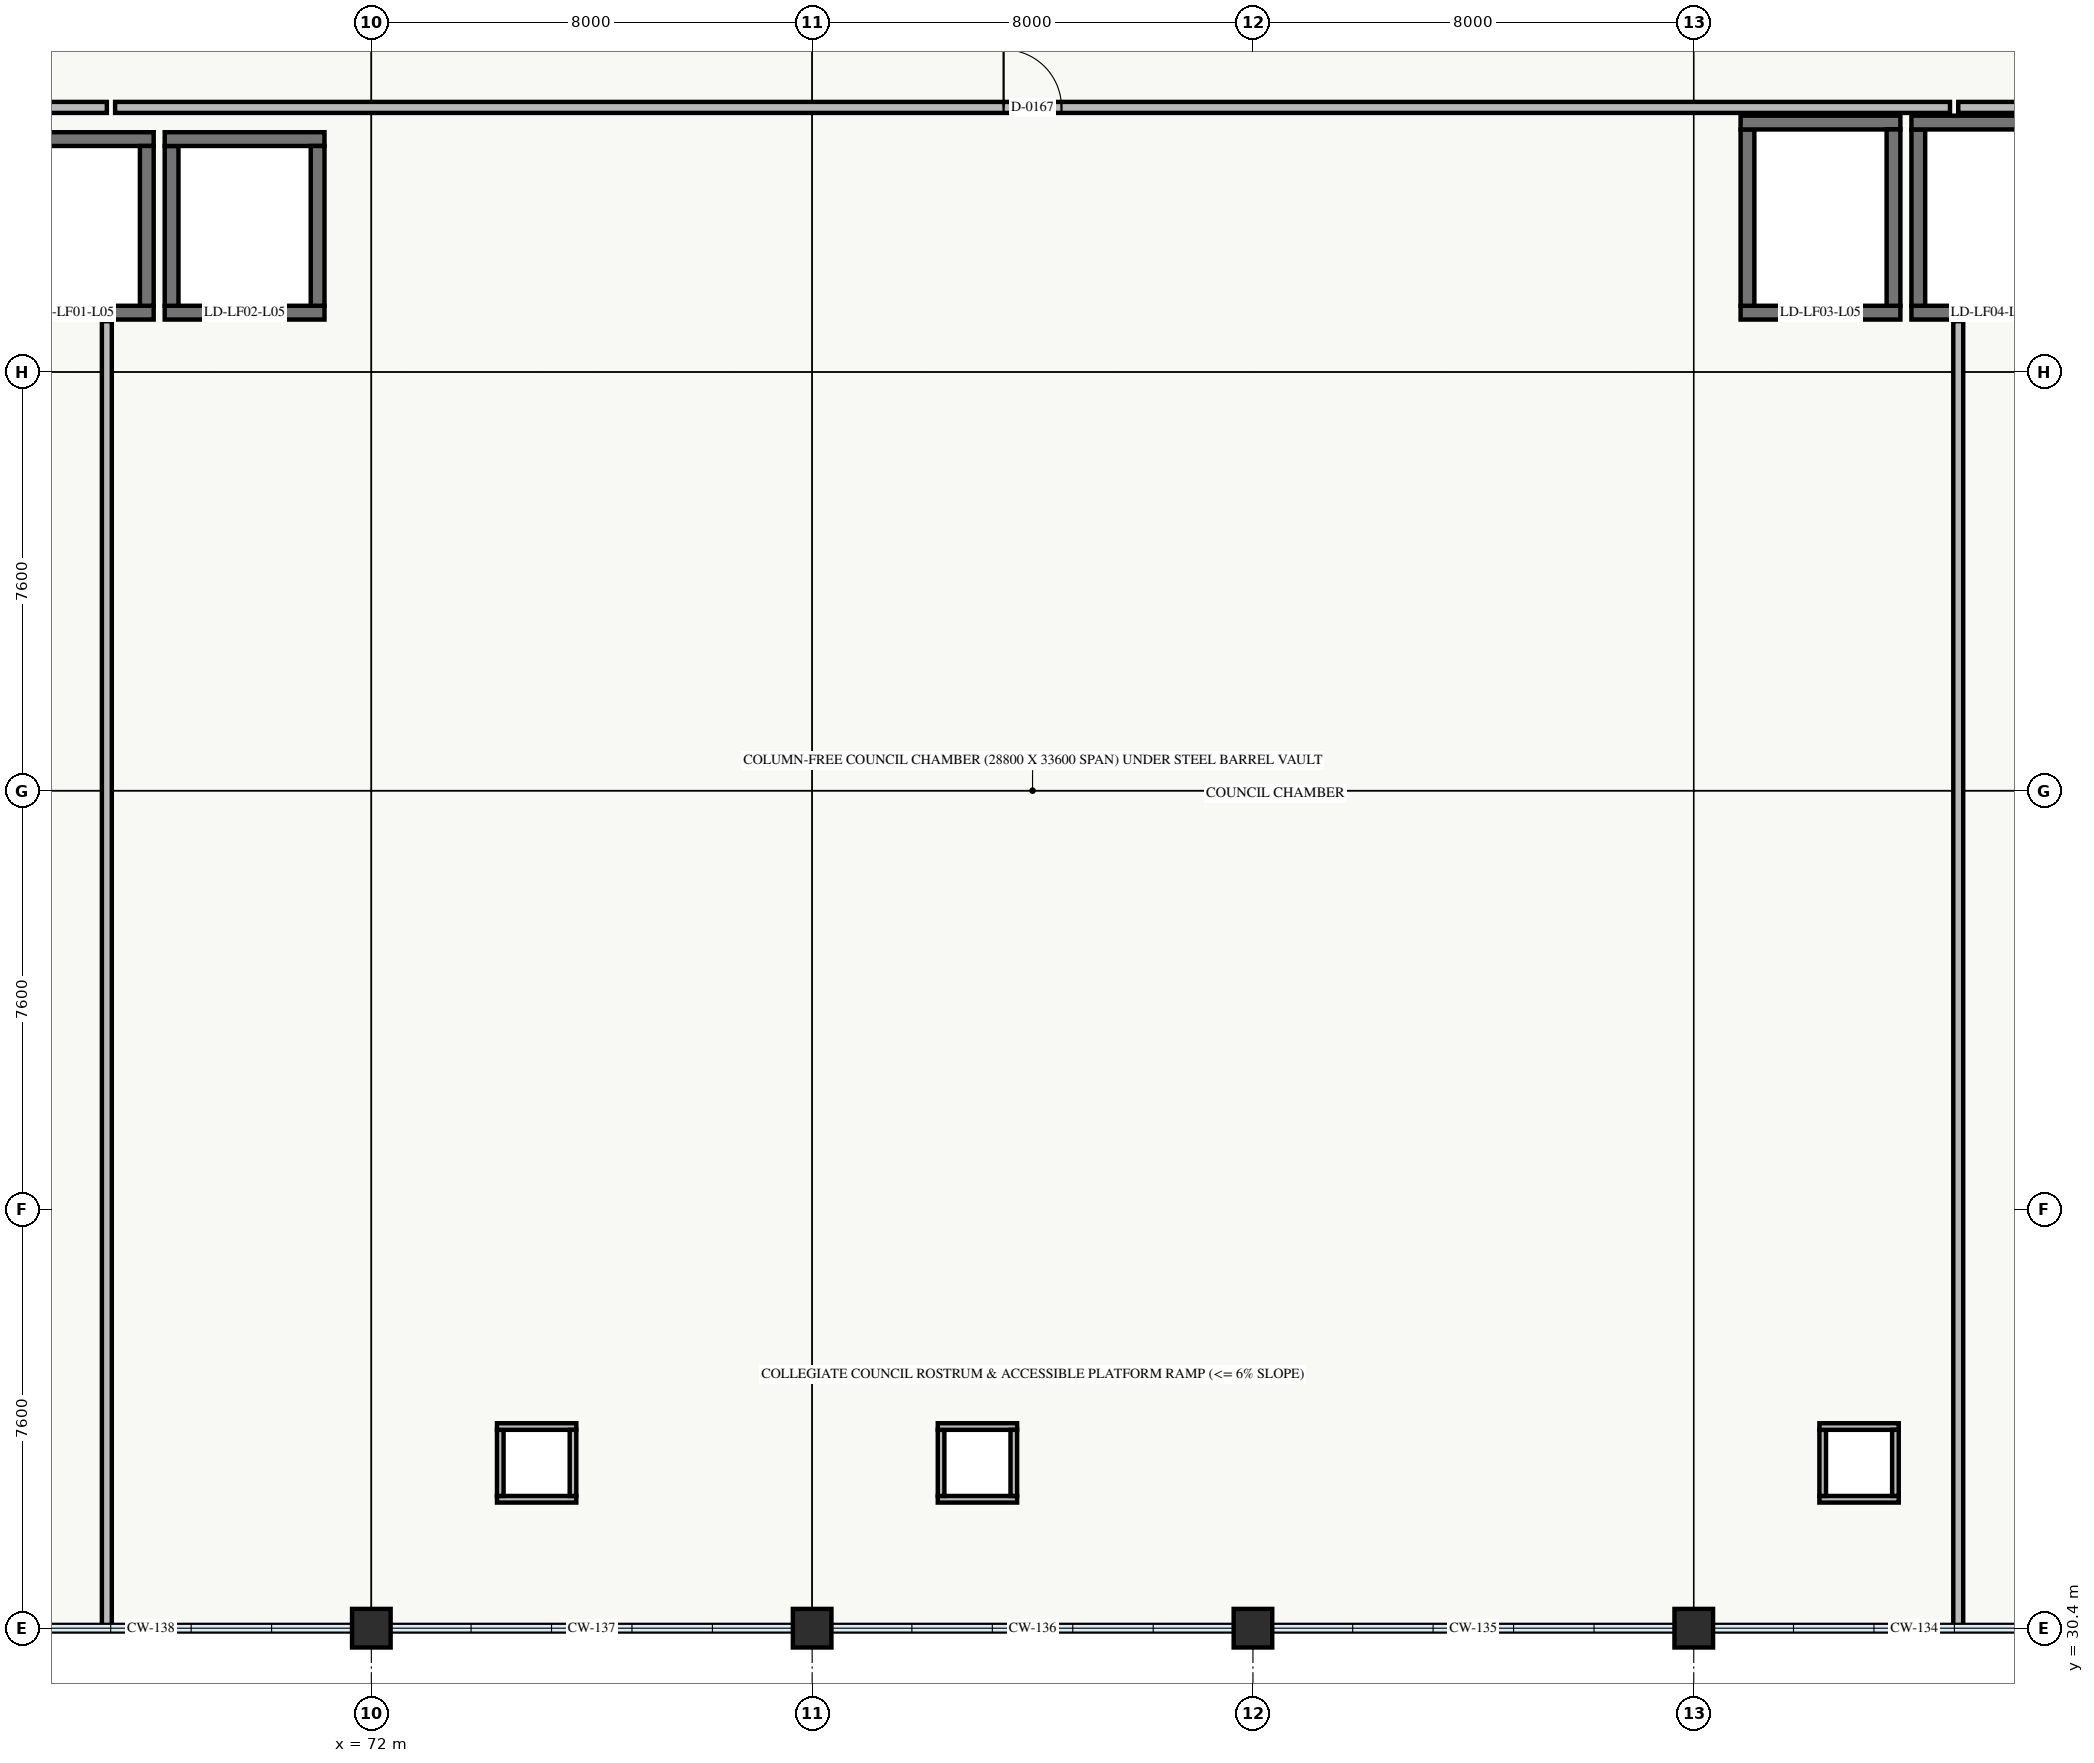
"""IFC4 building model, lengths in metres.
Left out: names, types, materials, properties, quantities, classifications, styles, units other than length and angle.
Written with IfcOpenShell. Run it as: python <this file> out.ifc"""

import sys

from ifc_helpers import new_model, si_unit, direction, frame, frame_2d, origin, origin_2d, place, context, subcontext, project, spatial, rectangle, extrude, element, fill, save


model = new_model("IFC4")
c1 = context("Model", 3, precision=1e-05, world=origin(), true_north=direction((0.0, 1.0)))
c2 = subcontext(c1, "Body", "Model", "MODEL_VIEW")
j1 = project(units=[si_unit("LENGTHUNIT", "METRE"), si_unit("PLANEANGLEUNIT", "RADIAN")], contexts=[c1])
p1 = place(None, origin())
s1 = spatial("IfcSite", under=j1, at=p1, CompositionType="ELEMENT")
p2 = place(p1, origin())
s2 = spatial("IfcBuilding", under=s1, at=p2, CompositionType="ELEMENT")
p3 = place(p2, frame((0.0, 0.0, 18.9)))
s3 = spatial("IfcBuildingStorey", under=s2, at=p3, CompositionType="ELEMENT", Elevation=18.9)
for number, where, z_axis, x_axis in (
    (1, (72.0, 30.4, 0.0), (0.0, 0.0, 1.0), (1.0, 0.0, 0.0)),
    (2, (80.0, 30.4, 0.0), (0.0, 0.0, 1.0), (1.0, 0.0, 0.0)),
    (3, (88.0, 30.4, 0.0), (0.0, 0.0, 1.0), (1.0, 0.0, 0.0)),
    (4, (96.0, 30.4, 0.0), (0.0, 0.0, 1.0), (1.0, 0.0, 0.0)),
):
    element("IfcColumn", number, at=place(p3, frame(where, z_axis=z_axis, x_axis=x_axis)), inside=s3, PredefinedType="COLUMN", context=c2, shape_type="SweptSolid", body=[
        extrude(rectangle(XDim=0.7, YDim=0.7, at=origin_2d()), origin(), (0.0, 0.0, 1.0), 4.8),
    ])
p4 = place(p3, frame((68.05, 54.275, 0.0), z_axis=(0.0, 0.0, 1.0), x_axis=(-1.0, 0.0, 0.0)))
e5 = element("IfcWall", 5, at=p4, inside=s3, PredefinedType="SHEAR", context=c2, shape_type="SweptSolid", body=[
    extrude(rectangle(XDim=2.9, YDim=0.25, at=frame_2d((1.45, 0.0))), origin(), (0.0, 0.0, 1.0), 4.57),
])
p5 = place(p4, frame((0.9, 0.0, 0.0)))
e6 = element("IfcOpeningElement", 6, at=p5, cuts=e5, PredefinedType="OPENING", context=c2, shape_type="SweptSolid", body=[
    extrude(rectangle(XDim=1.1, YDim=2.15, at=frame_2d((0.55, 1.075))), frame((0.0, 0.135, 0.0), z_axis=(0.0, -1.0, 0.0), x_axis=(1.0, 0.0, 0.0)), (0.0, 0.0, 1.0), 0.27),
])
for number, where, z_axis, x_axis in (
    (7, (65.15, 57.425, 0.0), (0.0, 0.0, 1.0), (1.0, 0.0, 0.0)),
    (8, (67.925, 57.3, 0.0), (0.0, 0.0, 1.0), (0.0, -1.0, 0.0)),
):
    element("IfcWall", number, at=place(p3, frame(where, z_axis=z_axis, x_axis=x_axis)), inside=s3, PredefinedType="SHEAR", context=c2, shape_type="SweptSolid", body=[
        extrude(rectangle(XDim=2.9, YDim=0.25, at=frame_2d((1.45, 0.0))), origin(), (0.0, 0.0, 1.0), 4.57),
    ])
p6 = place(p3, frame((71.15, 54.275, 0.0), z_axis=(0.0, 0.0, 1.0), x_axis=(-1.0, 0.0, 0.0)))
e9 = element("IfcWall", 9, at=p6, inside=s3, PredefinedType="SHEAR", context=c2, shape_type="SweptSolid", body=[
    extrude(rectangle(XDim=2.9, YDim=0.25, at=frame_2d((1.45, 0.0))), origin(), (0.0, 0.0, 1.0), 4.57),
])
p7 = place(p6, frame((0.9, 0.0, 0.0)))
e10 = element("IfcOpeningElement", 10, at=p7, cuts=e9, PredefinedType="OPENING", context=c2, shape_type="SweptSolid", body=[
    extrude(rectangle(XDim=1.1, YDim=2.15, at=frame_2d((0.55, 1.075))), frame((0.0, 0.135, 0.0), z_axis=(0.0, -1.0, 0.0), x_axis=(1.0, 0.0, 0.0)), (0.0, 0.0, 1.0), 0.27),
])
p8 = place(p3, frame((68.375, 54.4, 0.0), z_axis=(0.0, 0.0, 1.0), x_axis=(0.0, 1.0, 0.0)))
e11 = element("IfcWall", 11, at=p8, inside=s3, PredefinedType="SHEAR", context=c2, shape_type="SweptSolid", body=[
    extrude(rectangle(XDim=2.9, YDim=0.25, at=frame_2d((1.45, 0.0))), origin(), (0.0, 0.0, 1.0), 4.57),
])
p9 = place(p3, frame((68.25, 57.425, 0.0), z_axis=(0.0, 0.0, 1.0), x_axis=(1.0, 0.0, 0.0)))
e12 = element("IfcWall", 12, at=p9, inside=s3, PredefinedType="SHEAR", context=c2, shape_type="SweptSolid", body=[
    extrude(rectangle(XDim=2.9, YDim=0.25, at=frame_2d((1.45, 0.0))), origin(), (0.0, 0.0, 1.0), 4.57),
])
p10 = place(p3, frame((71.025, 57.3, 0.0), z_axis=(0.0, 0.0, 1.0), x_axis=(0.0, -1.0, 0.0)))
e13 = element("IfcWall", 13, at=p10, inside=s3, PredefinedType="SHEAR", context=c2, shape_type="SweptSolid", body=[
    extrude(rectangle(XDim=2.9, YDim=0.25, at=frame_2d((1.45, 0.0))), origin(), (0.0, 0.0, 1.0), 4.57),
])
p11 = place(p3, frame((99.75, 54.275, 0.0), z_axis=(0.0, 0.0, 1.0), x_axis=(-1.0, 0.0, 0.0)))
e14 = element("IfcWall", 14, at=p11, inside=s3, PredefinedType="SHEAR", context=c2, shape_type="SweptSolid", body=[
    extrude(rectangle(XDim=2.9, YDim=0.25, at=frame_2d((1.45, 0.0))), origin(), (0.0, 0.0, 1.0), 4.8),
])
p12 = place(p11, frame((0.9, 0.0, 0.0)))
e15 = element("IfcOpeningElement", 15, at=p12, cuts=e14, PredefinedType="OPENING", context=c2, shape_type="SweptSolid", body=[
    extrude(rectangle(XDim=1.1, YDim=2.15, at=frame_2d((0.55, 1.075))), frame((0.0, 0.135, 0.0), z_axis=(0.0, -1.0, 0.0), x_axis=(1.0, 0.0, 0.0)), (0.0, 0.0, 1.0), 0.27),
])
p13 = place(p3, frame((96.975, 54.4, 0.0), z_axis=(0.0, 0.0, 1.0), x_axis=(0.0, 1.0, 0.0)))
e16 = element("IfcWall", 16, at=p13, inside=s3, PredefinedType="SHEAR", context=c2, shape_type="SweptSolid", body=[
    extrude(rectangle(XDim=3.2, YDim=0.25, at=frame_2d((1.6, 0.0))), origin(), (0.0, 0.0, 1.0), 4.8),
])
p14 = place(p3, frame((96.85, 57.725, 0.0), z_axis=(0.0, 0.0, 1.0), x_axis=(1.0, 0.0, 0.0)))
e17 = element("IfcWall", 17, at=p14, inside=s3, PredefinedType="SHEAR", context=c2, shape_type="SweptSolid", body=[
    extrude(rectangle(XDim=2.9, YDim=0.25, at=frame_2d((1.45, 0.0))), origin(), (0.0, 0.0, 1.0), 4.8),
])
p15 = place(p3, frame((99.625, 57.6, 0.0), z_axis=(0.0, 0.0, 1.0), x_axis=(0.0, -1.0, 0.0)))
e18 = element("IfcWall", 18, at=p15, inside=s3, PredefinedType="SHEAR", context=c2, shape_type="SweptSolid", body=[
    extrude(rectangle(XDim=3.2, YDim=0.25, at=frame_2d((1.6, 0.0))), origin(), (0.0, 0.0, 1.0), 4.8),
])
p16 = place(p3, frame((102.85, 54.275, 0.0), z_axis=(0.0, 0.0, 1.0), x_axis=(-1.0, 0.0, 0.0)))
e19 = element("IfcWall", 19, at=p16, inside=s3, PredefinedType="SHEAR", context=c2, shape_type="SweptSolid", body=[
    extrude(rectangle(XDim=2.9, YDim=0.25, at=frame_2d((1.45, 0.0))), origin(), (0.0, 0.0, 1.0), 4.8),
])
p17 = place(p16, frame((0.9, 0.0, 0.0)))
e20 = element("IfcOpeningElement", 20, at=p17, cuts=e19, PredefinedType="OPENING", context=c2, shape_type="SweptSolid", body=[
    extrude(rectangle(XDim=1.1, YDim=2.15, at=frame_2d((0.55, 1.075))), frame((0.0, 0.135, 0.0), z_axis=(0.0, -1.0, 0.0), x_axis=(1.0, 0.0, 0.0)), (0.0, 0.0, 1.0), 0.27),
])
p18 = place(p3, frame((100.075, 54.4, 0.0), z_axis=(0.0, 0.0, 1.0), x_axis=(0.0, 1.0, 0.0)))
e21 = element("IfcWall", 21, at=p18, inside=s3, PredefinedType="SHEAR", context=c2, shape_type="SweptSolid", body=[
    extrude(rectangle(XDim=3.2, YDim=0.25, at=frame_2d((1.6, 0.0))), origin(), (0.0, 0.0, 1.0), 4.8),
])
p19 = place(p3, frame((99.95, 57.725, 0.0), z_axis=(0.0, 0.0, 1.0), x_axis=(1.0, 0.0, 0.0)))
e22 = element("IfcWall", 22, at=p19, inside=s3, PredefinedType="SHEAR", context=c2, shape_type="SweptSolid", body=[
    extrude(rectangle(XDim=2.9, YDim=0.25, at=frame_2d((1.45, 0.0))), origin(), (0.0, 0.0, 1.0), 4.8),
])
p20 = place(p3, frame((75.72, 32.74, 0.0), z_axis=(0.0, 0.0, 1.0), x_axis=(-1.0, 0.0, 0.0)))
e23 = element("IfcWall", 23, at=p20, inside=s3, PredefinedType="PARTITIONING", context=c2, shape_type="SweptSolid", body=[
    extrude(rectangle(XDim=1.44, YDim=0.12, at=frame_2d((0.72, 0.0))), origin(), (0.0, 0.0, 1.0), 4.57),
])
p21 = place(p3, frame((74.34, 32.8, 0.0), z_axis=(0.0, 0.0, 1.0), x_axis=(0.0, 1.0, 0.0)))
e24 = element("IfcWall", 24, at=p21, inside=s3, PredefinedType="PARTITIONING", context=c2, shape_type="SweptSolid", body=[
    extrude(rectangle(XDim=1.2, YDim=0.12, at=frame_2d((0.6, 0.0))), origin(), (0.0, 0.0, 1.0), 4.57),
])
p22 = place(p3, frame((74.28, 34.06, 0.0), z_axis=(0.0, 0.0, 1.0), x_axis=(1.0, 0.0, 0.0)))
e25 = element("IfcWall", 25, at=p22, inside=s3, PredefinedType="PARTITIONING", context=c2, shape_type="SweptSolid", body=[
    extrude(rectangle(XDim=1.44, YDim=0.12, at=frame_2d((0.72, 0.0))), origin(), (0.0, 0.0, 1.0), 4.57),
])
p23 = place(p3, frame((75.66, 34.0, 0.0), z_axis=(0.0, 0.0, 1.0), x_axis=(0.0, -1.0, 0.0)))
e26 = element("IfcWall", 26, at=p23, inside=s3, PredefinedType="PARTITIONING", context=c2, shape_type="SweptSolid", body=[
    extrude(rectangle(XDim=1.2, YDim=0.12, at=frame_2d((0.6, 0.0))), origin(), (0.0, 0.0, 1.0), 4.57),
])
p24 = place(p3, frame((83.72, 32.74, 0.0), z_axis=(0.0, 0.0, 1.0), x_axis=(-1.0, 0.0, 0.0)))
e27 = element("IfcWall", 27, at=p24, inside=s3, PredefinedType="PARTITIONING", context=c2, shape_type="SweptSolid", body=[
    extrude(rectangle(XDim=1.44, YDim=0.12, at=frame_2d((0.72, 0.0))), origin(), (0.0, 0.0, 1.0), 4.57),
])
p25 = place(p3, frame((82.34, 32.8, 0.0), z_axis=(0.0, 0.0, 1.0), x_axis=(0.0, 1.0, 0.0)))
e28 = element("IfcWall", 28, at=p25, inside=s3, PredefinedType="PARTITIONING", context=c2, shape_type="SweptSolid", body=[
    extrude(rectangle(XDim=1.2, YDim=0.12, at=frame_2d((0.6, 0.0))), origin(), (0.0, 0.0, 1.0), 4.57),
])
p26 = place(p3, frame((82.28, 34.06, 0.0), z_axis=(0.0, 0.0, 1.0), x_axis=(1.0, 0.0, 0.0)))
e29 = element("IfcWall", 29, at=p26, inside=s3, PredefinedType="PARTITIONING", context=c2, shape_type="SweptSolid", body=[
    extrude(rectangle(XDim=1.44, YDim=0.12, at=frame_2d((0.72, 0.0))), origin(), (0.0, 0.0, 1.0), 4.57),
])
p27 = place(p3, frame((83.66, 34.0, 0.0), z_axis=(0.0, 0.0, 1.0), x_axis=(0.0, -1.0, 0.0)))
e30 = element("IfcWall", 30, at=p27, inside=s3, PredefinedType="PARTITIONING", context=c2, shape_type="SweptSolid", body=[
    extrude(rectangle(XDim=1.2, YDim=0.12, at=frame_2d((0.6, 0.0))), origin(), (0.0, 0.0, 1.0), 4.57),
])
p28 = place(p3, frame((99.72, 32.74, 0.0), z_axis=(0.0, 0.0, 1.0), x_axis=(-1.0, 0.0, 0.0)))
e31 = element("IfcWall", 31, at=p28, inside=s3, PredefinedType="PARTITIONING", context=c2, shape_type="SweptSolid", body=[
    extrude(rectangle(XDim=1.44, YDim=0.12, at=frame_2d((0.72, 0.0))), origin(), (0.0, 0.0, 1.0), 4.57),
])
p29 = place(p3, frame((98.34, 32.8, 0.0), z_axis=(0.0, 0.0, 1.0), x_axis=(0.0, 1.0, 0.0)))
e32 = element("IfcWall", 32, at=p29, inside=s3, PredefinedType="PARTITIONING", context=c2, shape_type="SweptSolid", body=[
    extrude(rectangle(XDim=1.2, YDim=0.12, at=frame_2d((0.6, 0.0))), origin(), (0.0, 0.0, 1.0), 4.57),
])
p30 = place(p3, frame((98.28, 34.06, 0.0), z_axis=(0.0, 0.0, 1.0), x_axis=(1.0, 0.0, 0.0)))
e33 = element("IfcWall", 33, at=p30, inside=s3, PredefinedType="PARTITIONING", context=c2, shape_type="SweptSolid", body=[
    extrude(rectangle(XDim=1.44, YDim=0.12, at=frame_2d((0.72, 0.0))), origin(), (0.0, 0.0, 1.0), 4.57),
])
p31 = place(p3, frame((99.66, 34.0, 0.0), z_axis=(0.0, 0.0, 1.0), x_axis=(0.0, -1.0, 0.0)))
e34 = element("IfcWall", 34, at=p31, inside=s3, PredefinedType="PARTITIONING", context=c2, shape_type="SweptSolid", body=[
    extrude(rectangle(XDim=1.2, YDim=0.12, at=frame_2d((0.6, 0.0))), origin(), (0.0, 0.0, 1.0), 4.57),
])
p32 = place(p3, frame((67.2, 54.12, 0.0), z_axis=(0.0, 0.0, 1.0), x_axis=(0.0, -1.0, 0.0)))
e35 = element("IfcWall", 35, at=p32, inside=s3, PredefinedType="PARTITIONING", context=c2, shape_type="SweptSolid", body=[
    extrude(rectangle(XDim=23.72, YDim=0.18, at=frame_2d((11.86, 0.0))), origin(), (0.0, 0.0, 1.0), 2.77),
])
p33 = place(p3, frame((56.0, 58.0, 0.0), z_axis=(0.0, 0.0, 1.0), x_axis=(1.0, 0.0, 0.0)))
e36 = element("IfcWall", 36, at=p33, inside=s3, PredefinedType="STANDARD", context=c2, shape_type="SweptSolid", body=[
    extrude(rectangle(XDim=11.2, YDim=0.2, at=frame_2d((5.6, 0.0))), origin(), (0.0, 0.0, 1.0), 4.52),
])
p34 = place(p33, frame((4.8, 0.0, 0.0)))
e37 = element("IfcOpeningElement", 37, at=p34, cuts=e36, PredefinedType="OPENING", context=c2, shape_type="SweptSolid", body=[
    extrude(rectangle(XDim=1.6, YDim=2.3, at=frame_2d((0.8, 1.15))), frame((0.0, 0.11, 0.0), z_axis=(0.0, -1.0, 0.0), x_axis=(1.0, 0.0, 0.0)), (0.0, 0.0, 1.0), 0.22),
])
p35 = place(p33, frame((3.05, 0.0, 0.0)))
e38 = element("IfcOpeningElement", 38, at=p35, cuts=e36, PredefinedType="OPENING", context=c2, shape_type="SweptSolid", body=[
    extrude(rectangle(XDim=1.6, YDim=2.3, at=frame_2d((0.8, 1.15))), frame((0.0, 0.11, 0.0), z_axis=(0.0, -1.0, 0.0), x_axis=(1.0, 0.0, 0.0)), (0.0, 0.0, 1.0), 0.22),
])
p36 = place(p3, frame((100.8, 30.4, 0.0), z_axis=(0.0, 0.0, 1.0), x_axis=(0.0, 1.0, 0.0)))
e39 = element("IfcWall", 39, at=p36, inside=s3, PredefinedType="PARTITIONING", context=c2, shape_type="SweptSolid", body=[
    extrude(rectangle(XDim=23.72, YDim=0.18, at=frame_2d((11.86, 0.0))), origin(), (0.0, 0.0, 1.0), 2.77),
])
p37 = place(p3, frame((100.8, 58.0, 0.0), z_axis=(0.0, 0.0, 1.0), x_axis=(1.0, 0.0, 0.0)))
e40 = element("IfcWall", 40, at=p37, inside=s3, PredefinedType="STANDARD", context=c2, shape_type="SweptSolid", body=[
    extrude(rectangle(XDim=11.2, YDim=0.2, at=frame_2d((5.6, 0.0))), origin(), (0.0, 0.0, 1.0), 4.52),
])
p38 = place(p37, frame((4.8, 0.0, 0.0)))
e41 = element("IfcOpeningElement", 41, at=p38, cuts=e40, PredefinedType="OPENING", context=c2, shape_type="SweptSolid", body=[
    extrude(rectangle(XDim=1.6, YDim=2.3, at=frame_2d((0.8, 1.15))), frame((0.0, 0.11, 0.0), z_axis=(0.0, -1.0, 0.0), x_axis=(1.0, 0.0, 0.0)), (0.0, 0.0, 1.0), 0.22),
])
p39 = place(p3, frame((67.35, 58.0, 0.0), z_axis=(0.0, 0.0, 1.0), x_axis=(1.0, 0.0, 0.0)))
e42 = element("IfcWall", 42, at=p39, inside=s3, PredefinedType="STANDARD", context=c2, shape_type="SweptSolid", body=[
    extrude(rectangle(XDim=33.3, YDim=0.2, at=frame_2d((16.65, 0.0))), origin(), (0.0, 0.0, 1.0), 2.77),
])
p40 = place(p39, frame((16.125, 0.0, 0.0)))
e43 = element("IfcOpeningElement", 43, at=p40, cuts=e42, PredefinedType="OPENING", context=c2, shape_type="SweptSolid", body=[
    extrude(rectangle(XDim=1.05, YDim=2.15, at=frame_2d((0.525, 1.075))), frame((0.0, 0.11, 0.0), z_axis=(0.0, -1.0, 0.0), x_axis=(1.0, 0.0, 0.0)), (0.0, 0.0, 1.0), 0.22),
])
p41 = place(p5, origin())
e44 = element("IfcDoor", 44, at=p41, inside=s3, OperationType="DOUBLE_DOOR_SLIDING", PredefinedType="DOOR", context=c2, shape_type="SweptSolid", body=[
    extrude(rectangle(XDim=1.1, YDim=2.15, at=frame_2d((0.55, 1.075))), frame((0.0, 0.025, 0.0), z_axis=(0.0, -1.0, 0.0), x_axis=(1.0, 0.0, 0.0)), (0.0, 0.0, 1.0), 0.05),
])
fill(e6, e44)
p42 = place(p7, origin())
e45 = element("IfcDoor", 45, at=p42, inside=s3, OperationType="DOUBLE_DOOR_SLIDING", PredefinedType="DOOR", context=c2, shape_type="SweptSolid", body=[
    extrude(rectangle(XDim=1.1, YDim=2.15, at=frame_2d((0.55, 1.075))), frame((0.0, 0.025, 0.0), z_axis=(0.0, -1.0, 0.0), x_axis=(1.0, 0.0, 0.0)), (0.0, 0.0, 1.0), 0.05),
])
fill(e10, e45)
p43 = place(p12, origin())
e46 = element("IfcDoor", 46, at=p43, inside=s3, OperationType="DOUBLE_DOOR_SLIDING", PredefinedType="DOOR", context=c2, shape_type="SweptSolid", body=[
    extrude(rectangle(XDim=1.1, YDim=2.15, at=frame_2d((0.55, 1.075))), frame((0.0, 0.025, 0.0), z_axis=(0.0, -1.0, 0.0), x_axis=(1.0, 0.0, 0.0)), (0.0, 0.0, 1.0), 0.05),
])
fill(e15, e46)
p44 = place(p17, origin())
e47 = element("IfcDoor", 47, at=p44, inside=s3, OperationType="DOUBLE_DOOR_SLIDING", PredefinedType="DOOR", context=c2, shape_type="SweptSolid", body=[
    extrude(rectangle(XDim=1.1, YDim=2.15, at=frame_2d((0.55, 1.075))), frame((0.0, 0.025, 0.0), z_axis=(0.0, -1.0, 0.0), x_axis=(1.0, 0.0, 0.0)), (0.0, 0.0, 1.0), 0.05),
])
fill(e20, e47)
p45 = place(p40, origin())
e48 = element("IfcDoor", 48, at=p45, inside=s3, OperationType="SINGLE_SWING_LEFT", PredefinedType="DOOR", context=c2, shape_type="SweptSolid", body=[
    extrude(rectangle(XDim=1.05, YDim=2.15, at=frame_2d((0.525, 1.075))), frame((0.0, 0.025, 0.0), z_axis=(0.0, -1.0, 0.0), x_axis=(1.0, 0.0, 0.0)), (0.0, 0.0, 1.0), 0.05),
])
fill(e43, e48)
save(model, sys.argv[1])
